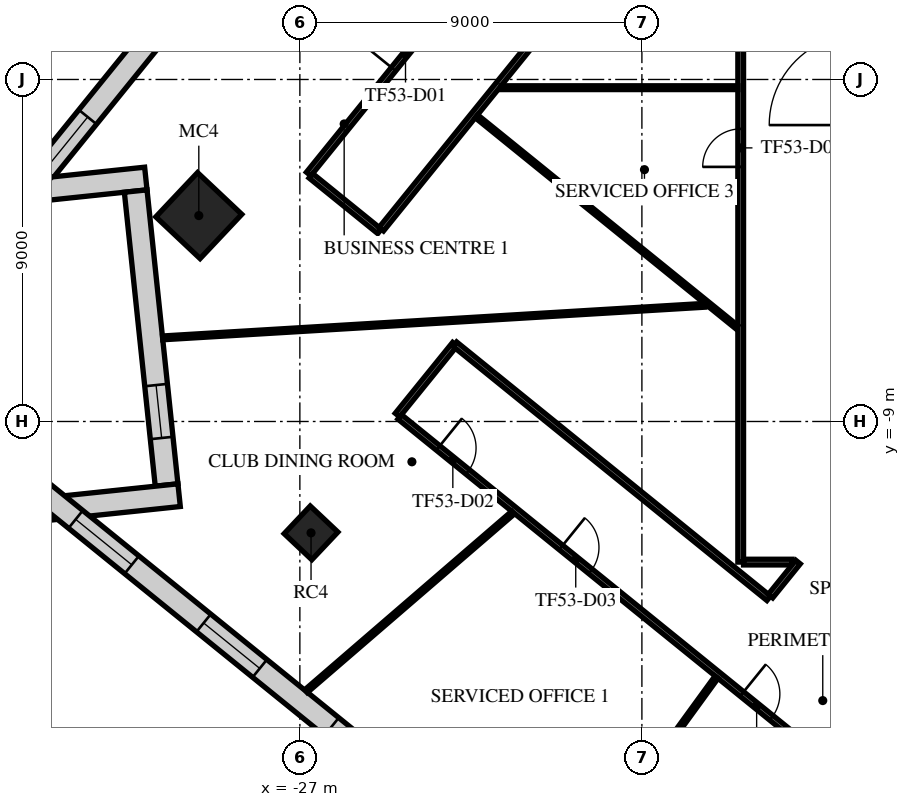
"""IFC4 building model, lengths in metres.
Left out: names, types, materials, properties, quantities, classifications, styles, units other than length and angle.
Written with IfcOpenShell. Run it as: python <this file> out.ifc"""

import sys

from ifc_helpers import new_model, si_unit, direction, frame, frame_2d, origin, origin_2d, place, context, subcontext, project, spatial, rectangle, extrude, element, fill, save


model = new_model("IFC4")
c1 = context("Model", 3, precision=1e-05, world=origin(), true_north=direction((0.0, 1.0)))
c2 = subcontext(c1, "Body", "Model", "MODEL_VIEW")
j1 = project(units=[si_unit("LENGTHUNIT", "METRE"), si_unit("PLANEANGLEUNIT", "RADIAN")], contexts=[c1])
p1 = place(None, origin())
s1 = spatial("IfcSite", under=j1, at=p1, CompositionType="ELEMENT")
p2 = place(p1, origin())
s2 = spatial("IfcBuilding", under=s1, at=p2, CompositionType="ELEMENT")
p3 = place(p2, frame((0.0, 0.0, 225.3)))
s3 = spatial("IfcBuildingStorey", under=s2, at=p3, CompositionType="ELEMENT", Elevation=225.3)
p4 = place(p3, frame((-29.659, -3.582, 0.0), z_axis=(0.0, 0.0, 1.0), x_axis=(0.685916152371, 0.727680583715, 0.0)))
e1 = element("IfcColumn", 1, at=p4, inside=s3, PredefinedType="COLUMN", context=c2, shape_type="SweptSolid", body=[
    extrude(rectangle(XDim=1.6, YDim=1.6, at=origin_2d()), origin(), (0.0, 0.0, 1.0), 4.0),
])
p5 = place(p3, frame((-26.706, -11.931, 0.0), z_axis=(0.0, 0.0, 1.0), x_axis=(0.685916152371, 0.727680583715, 0.0)))
e2 = element("IfcColumn", 2, at=p5, inside=s3, PredefinedType="COLUMN", context=c2, shape_type="SweptSolid", body=[
    extrude(rectangle(XDim=1.0, YDim=1.0, at=origin_2d()), origin(), (0.0, 0.0, 1.0), 4.0),
])
p6 = place(p3, frame((-3.777, 34.584, 0.0), z_axis=(0.0, 0.0, 1.0), x_axis=(-0.629323778295, -0.777143218508, 0.0)))
e3 = element("IfcWall", 3, at=p6, inside=s3, PredefinedType="STANDARD", context=c2, shape_type="SweptSolid", body=[
    extrude(rectangle(XDim=49.0, YDim=0.6, at=frame_2d((24.5, 0.0))), origin(), (0.0, 0.0, 1.0), 3.62),
])
p7 = place(p6, frame((1.227, 0.0, 0.9)))
e4 = element("IfcOpeningElement", 4, at=p7, cuts=e3, PredefinedType="OPENING", context=c2, shape_type="SweptSolid", body=[
    extrude(rectangle(XDim=2.0, YDim=2.1, at=frame_2d((1.0, 1.05))), frame((0.0, 0.31, 0.0), z_axis=(0.0, -1.0, 0.0), x_axis=(1.0, 0.0, 0.0)), (0.0, 0.0, 1.0), 0.62),
])
p8 = place(p6, frame((5.682, 0.0, 0.9)))
e5 = element("IfcOpeningElement", 5, at=p8, cuts=e3, PredefinedType="OPENING", context=c2, shape_type="SweptSolid", body=[
    extrude(rectangle(XDim=2.0, YDim=2.1, at=frame_2d((1.0, 1.05))), frame((0.0, 0.31, 0.0), z_axis=(0.0, -1.0, 0.0), x_axis=(1.0, 0.0, 0.0)), (0.0, 0.0, 1.0), 0.62),
])
p9 = place(p6, frame((10.136, 0.0, 0.9)))
e6 = element("IfcOpeningElement", 6, at=p9, cuts=e3, PredefinedType="OPENING", context=c2, shape_type="SweptSolid", body=[
    extrude(rectangle(XDim=2.0, YDim=2.1, at=frame_2d((1.0, 1.05))), frame((0.0, 0.31, 0.0), z_axis=(0.0, -1.0, 0.0), x_axis=(1.0, 0.0, 0.0)), (0.0, 0.0, 1.0), 0.62),
])
p10 = place(p6, frame((14.591, 0.0, 0.9)))
e7 = element("IfcOpeningElement", 7, at=p10, cuts=e3, PredefinedType="OPENING", context=c2, shape_type="SweptSolid", body=[
    extrude(rectangle(XDim=2.0, YDim=2.1, at=frame_2d((1.0, 1.05))), frame((0.0, 0.31, 0.0), z_axis=(0.0, -1.0, 0.0), x_axis=(1.0, 0.0, 0.0)), (0.0, 0.0, 1.0), 0.62),
])
p11 = place(p6, frame((19.045, 0.0, 0.9)))
e8 = element("IfcOpeningElement", 8, at=p11, cuts=e3, PredefinedType="OPENING", context=c2, shape_type="SweptSolid", body=[
    extrude(rectangle(XDim=2.0, YDim=2.1, at=frame_2d((1.0, 1.05))), frame((0.0, 0.31, 0.0), z_axis=(0.0, -1.0, 0.0), x_axis=(1.0, 0.0, 0.0)), (0.0, 0.0, 1.0), 0.62),
])
p12 = place(p6, frame((23.5, 0.0, 0.9)))
e9 = element("IfcOpeningElement", 9, at=p12, cuts=e3, PredefinedType="OPENING", context=c2, shape_type="SweptSolid", body=[
    extrude(rectangle(XDim=2.0, YDim=2.1, at=frame_2d((1.0, 1.05))), frame((0.0, 0.31, 0.0), z_axis=(0.0, -1.0, 0.0), x_axis=(1.0, 0.0, 0.0)), (0.0, 0.0, 1.0), 0.62),
])
p13 = place(p6, frame((27.955, 0.0, 0.9)))
e10 = element("IfcOpeningElement", 10, at=p13, cuts=e3, PredefinedType="OPENING", context=c2, shape_type="SweptSolid", body=[
    extrude(rectangle(XDim=2.0, YDim=2.1, at=frame_2d((1.0, 1.05))), frame((0.0, 0.31, 0.0), z_axis=(0.0, -1.0, 0.0), x_axis=(1.0, 0.0, 0.0)), (0.0, 0.0, 1.0), 0.62),
])
p14 = place(p6, frame((32.409, 0.0, 0.9)))
e11 = element("IfcOpeningElement", 11, at=p14, cuts=e3, PredefinedType="OPENING", context=c2, shape_type="SweptSolid", body=[
    extrude(rectangle(XDim=2.0, YDim=2.1, at=frame_2d((1.0, 1.05))), frame((0.0, 0.31, 0.0), z_axis=(0.0, -1.0, 0.0), x_axis=(1.0, 0.0, 0.0)), (0.0, 0.0, 1.0), 0.62),
])
p15 = place(p6, frame((36.864, 0.0, 0.9)))
e12 = element("IfcOpeningElement", 12, at=p15, cuts=e3, PredefinedType="OPENING", context=c2, shape_type="SweptSolid", body=[
    extrude(rectangle(XDim=2.0, YDim=2.1, at=frame_2d((1.0, 1.05))), frame((0.0, 0.31, 0.0), z_axis=(0.0, -1.0, 0.0), x_axis=(1.0, 0.0, 0.0)), (0.0, 0.0, 1.0), 0.62),
])
p16 = place(p6, frame((41.318, 0.0, 0.9)))
e13 = element("IfcOpeningElement", 13, at=p16, cuts=e3, PredefinedType="OPENING", context=c2, shape_type="SweptSolid", body=[
    extrude(rectangle(XDim=2.0, YDim=2.1, at=frame_2d((1.0, 1.05))), frame((0.0, 0.31, 0.0), z_axis=(0.0, -1.0, 0.0), x_axis=(1.0, 0.0, 0.0)), (0.0, 0.0, 1.0), 0.62),
])
p17 = place(p6, frame((45.773, 0.0, 0.9)))
e14 = element("IfcOpeningElement", 14, at=p17, cuts=e3, PredefinedType="OPENING", context=c2, shape_type="SweptSolid", body=[
    extrude(rectangle(XDim=2.0, YDim=2.1, at=frame_2d((1.0, 1.05))), frame((0.0, 0.31, 0.0), z_axis=(0.0, -1.0, 0.0), x_axis=(1.0, 0.0, 0.0)), (0.0, 0.0, 1.0), 0.62),
])
p18 = place(p3, frame((-34.878, -3.009, 0.0), z_axis=(0.0, 0.0, 1.0), x_axis=(0.994521092097, 0.104536105602, 0.0)))
e15 = element("IfcWall", 15, at=p18, inside=s3, PredefinedType="STANDARD", context=c2, shape_type="SweptSolid", body=[
    extrude(rectangle(XDim=3.846, YDim=0.6, at=frame_2d((1.923, 0.0))), origin(), (0.0, 0.0, 1.0), 3.62),
])
p19 = place(p3, frame((-31.32, -2.936, 0.0), z_axis=(0.0, 0.0, 1.0), x_axis=(0.104552439276, -0.994519375096, 0.0)))
e16 = element("IfcWall", 16, at=p19, inside=s3, PredefinedType="STANDARD", context=c2, shape_type="SweptSolid", body=[
    extrude(rectangle(XDim=7.778, YDim=0.6, at=frame_2d((3.889, 0.0))), origin(), (0.0, 0.0, 1.0), 3.62),
])
p20 = place(p19, frame((5.134, 0.0, 0.9)))
e17 = element("IfcOpeningElement", 17, at=p20, cuts=e16, PredefinedType="OPENING", context=c2, shape_type="SweptSolid", body=[
    extrude(rectangle(XDim=1.4, YDim=2.1, at=frame_2d((0.7, 1.05))), frame((0.0, 0.31, 0.0), z_axis=(0.0, -1.0, 0.0), x_axis=(1.0, 0.0, 0.0)), (0.0, 0.0, 1.0), 0.62),
])
p21 = place(p3, frame((-30.177, -10.939, 0.0), z_axis=(0.0, 0.0, 1.0), x_axis=(-0.994521092097, -0.104536105602, 0.0)))
e18 = element("IfcWall", 18, at=p21, inside=s3, PredefinedType="STANDARD", context=c2, shape_type="SweptSolid", body=[
    extrude(rectangle(XDim=3.846, YDim=0.6, at=frame_2d((1.923, 0.0))), origin(), (0.0, 0.0, 1.0), 3.62),
])
p22 = place(p3, frame((-33.845, -10.81, 0.0), z_axis=(0.0, 0.0, 1.0), x_axis=(0.777145437972, -0.629321037499, 0.0)))
e19 = element("IfcWall", 19, at=p22, inside=s3, PredefinedType="STANDARD", context=c2, shape_type="SweptSolid", body=[
    extrude(rectangle(XDim=39.0, YDim=0.6, at=frame_2d((19.5, 0.0))), origin(), (0.0, 0.0, 1.0), 3.62),
])
p23 = place(p22, frame((1.217, 0.0, 0.9)))
e20 = element("IfcOpeningElement", 20, at=p23, cuts=e19, PredefinedType="OPENING", context=c2, shape_type="SweptSolid", body=[
    extrude(rectangle(XDim=1.9, YDim=2.1, at=frame_2d((0.95, 1.05))), frame((0.0, 0.31, 0.0), z_axis=(0.0, -1.0, 0.0), x_axis=(1.0, 0.0, 0.0)), (0.0, 0.0, 1.0), 0.62),
])
p24 = place(p22, frame((5.55, 0.0, 0.9)))
e21 = element("IfcOpeningElement", 21, at=p24, cuts=e19, PredefinedType="OPENING", context=c2, shape_type="SweptSolid", body=[
    extrude(rectangle(XDim=1.9, YDim=2.1, at=frame_2d((0.95, 1.05))), frame((0.0, 0.31, 0.0), z_axis=(0.0, -1.0, 0.0), x_axis=(1.0, 0.0, 0.0)), (0.0, 0.0, 1.0), 0.62),
])
p25 = place(p22, frame((9.883, 0.0, 0.9)))
e22 = element("IfcOpeningElement", 22, at=p25, cuts=e19, PredefinedType="OPENING", context=c2, shape_type="SweptSolid", body=[
    extrude(rectangle(XDim=1.9, YDim=2.1, at=frame_2d((0.95, 1.05))), frame((0.0, 0.31, 0.0), z_axis=(0.0, -1.0, 0.0), x_axis=(1.0, 0.0, 0.0)), (0.0, 0.0, 1.0), 0.62),
])
p26 = place(p22, frame((14.217, 0.0, 0.9)))
e23 = element("IfcOpeningElement", 23, at=p26, cuts=e19, PredefinedType="OPENING", context=c2, shape_type="SweptSolid", body=[
    extrude(rectangle(XDim=1.9, YDim=2.1, at=frame_2d((0.95, 1.05))), frame((0.0, 0.31, 0.0), z_axis=(0.0, -1.0, 0.0), x_axis=(1.0, 0.0, 0.0)), (0.0, 0.0, 1.0), 0.62),
])
p27 = place(p22, frame((18.55, 0.0, 0.9)))
e24 = element("IfcOpeningElement", 24, at=p27, cuts=e19, PredefinedType="OPENING", context=c2, shape_type="SweptSolid", body=[
    extrude(rectangle(XDim=1.9, YDim=2.1, at=frame_2d((0.95, 1.05))), frame((0.0, 0.31, 0.0), z_axis=(0.0, -1.0, 0.0), x_axis=(1.0, 0.0, 0.0)), (0.0, 0.0, 1.0), 0.62),
])
p28 = place(p22, frame((22.883, 0.0, 0.9)))
e25 = element("IfcOpeningElement", 25, at=p28, cuts=e19, PredefinedType="OPENING", context=c2, shape_type="SweptSolid", body=[
    extrude(rectangle(XDim=1.9, YDim=2.1, at=frame_2d((0.95, 1.05))), frame((0.0, 0.31, 0.0), z_axis=(0.0, -1.0, 0.0), x_axis=(1.0, 0.0, 0.0)), (0.0, 0.0, 1.0), 0.62),
])
p29 = place(p22, frame((27.217, 0.0, 0.9)))
e26 = element("IfcOpeningElement", 26, at=p29, cuts=e19, PredefinedType="OPENING", context=c2, shape_type="SweptSolid", body=[
    extrude(rectangle(XDim=1.9, YDim=2.1, at=frame_2d((0.95, 1.05))), frame((0.0, 0.31, 0.0), z_axis=(0.0, -1.0, 0.0), x_axis=(1.0, 0.0, 0.0)), (0.0, 0.0, 1.0), 0.62),
])
p30 = place(p22, frame((31.55, 0.0, 0.9)))
e27 = element("IfcOpeningElement", 27, at=p30, cuts=e19, PredefinedType="OPENING", context=c2, shape_type="SweptSolid", body=[
    extrude(rectangle(XDim=1.9, YDim=2.1, at=frame_2d((0.95, 1.05))), frame((0.0, 0.31, 0.0), z_axis=(0.0, -1.0, 0.0), x_axis=(1.0, 0.0, 0.0)), (0.0, 0.0, 1.0), 0.62),
])
p31 = place(p22, frame((35.883, 0.0, 0.9)))
e28 = element("IfcOpeningElement", 28, at=p31, cuts=e19, PredefinedType="OPENING", context=c2, shape_type="SweptSolid", body=[
    extrude(rectangle(XDim=1.9, YDim=2.1, at=frame_2d((0.95, 1.05))), frame((0.0, 0.31, 0.0), z_axis=(0.0, -1.0, 0.0), x_axis=(1.0, 0.0, 0.0)), (0.0, 0.0, 1.0), 0.62),
])
p32 = place(p3, frame((-26.769, -2.487, 0.0), z_axis=(0.0, 0.0, 1.0), x_axis=(0.629320703929, 0.777145708092, 0.0)))
e29 = element("IfcWall", 29, at=p32, inside=s3, PredefinedType="PARTITIONING", context=c2, shape_type="SweptSolid", body=[
    extrude(rectangle(XDim=37.558, YDim=0.15, at=frame_2d((18.779, 0.0))), origin(), (0.0, 0.0, 1.0), 2.97),
])
p33 = place(p32, frame((3.55, 0.0, 0.0)))
e30 = element("IfcOpeningElement", 30, at=p33, cuts=e29, PredefinedType="OPENING", context=c2, shape_type="SweptSolid", body=[
    extrude(rectangle(XDim=1.0, YDim=2.1, at=frame_2d((0.5, 1.05))), frame((0.0, 0.085, 0.0), z_axis=(0.0, -1.0, 0.0), x_axis=(1.0, 0.0, 0.0)), (0.0, 0.0, 1.0), 0.17),
])
p34 = place(p32, frame((11.862, 0.0, 0.0)))
e31 = element("IfcOpeningElement", 31, at=p34, cuts=e29, PredefinedType="OPENING", context=c2, shape_type="SweptSolid", body=[
    extrude(rectangle(XDim=1.0, YDim=2.1, at=frame_2d((0.5, 1.05))), frame((0.0, 0.085, 0.0), z_axis=(0.0, -1.0, 0.0), x_axis=(1.0, 0.0, 0.0)), (0.0, 0.0, 1.0), 0.17),
])
p35 = place(p32, frame((21.452, 0.0, 0.0)))
e32 = element("IfcOpeningElement", 32, at=p35, cuts=e29, PredefinedType="OPENING", context=c2, shape_type="SweptSolid", body=[
    extrude(rectangle(XDim=1.0, YDim=2.1, at=frame_2d((0.5, 1.05))), frame((0.0, 0.085, 0.0), z_axis=(0.0, -1.0, 0.0), x_axis=(1.0, 0.0, 0.0)), (0.0, 0.0, 1.0), 0.17),
])
p36 = place(p32, frame((31.223, 0.0, 0.0)))
e33 = element("IfcOpeningElement", 33, at=p36, cuts=e29, PredefinedType="OPENING", context=c2, shape_type="SweptSolid", body=[
    extrude(rectangle(XDim=1.0, YDim=2.1, at=frame_2d((0.5, 1.05))), frame((0.0, 0.085, 0.0), z_axis=(0.0, -1.0, 0.0), x_axis=(1.0, 0.0, 0.0)), (0.0, 0.0, 1.0), 0.17),
])
p37 = place(p32, frame((35.359, 0.0, 0.0)))
e34 = element("IfcOpeningElement", 34, at=p37, cuts=e29, PredefinedType="OPENING", context=c2, shape_type="SweptSolid", body=[
    extrude(rectangle(XDim=1.0, YDim=2.1, at=frame_2d((0.5, 1.05))), frame((0.0, 0.085, 0.0), z_axis=(0.0, -1.0, 0.0), x_axis=(1.0, 0.0, 0.0)), (0.0, 0.0, 1.0), 0.17),
])
p38 = place(p3, frame((-26.711, -2.534, 0.0), z_axis=(0.0, 0.0, 1.0), x_axis=(0.777166601342, -0.62929490206, 0.0)))
e35 = element("IfcWall", 35, at=p38, inside=s3, PredefinedType="PARTITIONING", context=c2, shape_type="SweptSolid", body=[
    extrude(rectangle(XDim=2.325, YDim=0.15, at=frame_2d((1.162, 0.0))), origin(), (0.0, 0.0, 1.0), 3.17),
])
p39 = place(p3, frame((-24.857, -3.939, 0.0), z_axis=(0.0, 0.0, 1.0), x_axis=(0.629334227899, 0.777134756393, 0.0)))
e36 = element("IfcWall", 36, at=p39, inside=s3, PredefinedType="PARTITIONING", context=c2, shape_type="SweptSolid", body=[
    extrude(rectangle(XDim=15.027, YDim=0.15, at=frame_2d((7.513, 0.0))), origin(), (0.0, 0.0, 1.0), 3.17),
])
p40 = place(p3, frame((-24.432, -8.831, 0.0), z_axis=(0.0, 0.0, 1.0), x_axis=(0.629201155621, 0.77724250126, 0.0)))
e37 = element("IfcWall", 37, at=p40, inside=s3, PredefinedType="PARTITIONING", context=c2, shape_type="SweptSolid", body=[
    extrude(rectangle(XDim=2.399, YDim=0.15, at=frame_2d((1.2, 0.0))), origin(), (0.0, 0.0, 1.0), 3.17),
])
p41 = place(p3, frame((-24.374, -8.878, 0.0), z_axis=(0.0, 0.0, 1.0), x_axis=(0.777132572121, -0.629336925143, 0.0)))
e38 = element("IfcWall", 38, at=p41, inside=s3, PredefinedType="PARTITIONING", context=c2, shape_type="SweptSolid", body=[
    extrude(rectangle(XDim=26.785, YDim=0.15, at=frame_2d((13.393, 0.0))), origin(), (0.0, 0.0, 1.0), 3.17),
])
p42 = place(p41, frame((1.3, 0.0, 0.0)))
e39 = element("IfcOpeningElement", 39, at=p42, cuts=e38, PredefinedType="OPENING", context=c2, shape_type="SweptSolid", body=[
    extrude(rectangle(XDim=1.0, YDim=2.1, at=frame_2d((0.5, 1.05))), frame((0.0, 0.085, 0.0), z_axis=(0.0, -1.0, 0.0), x_axis=(1.0, 0.0, 0.0)), (0.0, 0.0, 1.0), 0.17),
])
p43 = place(p41, frame((5.461, 0.0, 0.0)))
e40 = element("IfcOpeningElement", 40, at=p43, cuts=e38, PredefinedType="OPENING", context=c2, shape_type="SweptSolid", body=[
    extrude(rectangle(XDim=1.0, YDim=2.1, at=frame_2d((0.5, 1.05))), frame((0.0, 0.085, 0.0), z_axis=(0.0, -1.0, 0.0), x_axis=(1.0, 0.0, 0.0)), (0.0, 0.0, 1.0), 0.17),
])
p44 = place(p41, frame((11.587, 0.0, 0.0)))
e41 = element("IfcOpeningElement", 41, at=p44, cuts=e38, PredefinedType="OPENING", context=c2, shape_type="SweptSolid", body=[
    extrude(rectangle(XDim=1.0, YDim=2.1, at=frame_2d((0.5, 1.05))), frame((0.0, 0.085, 0.0), z_axis=(0.0, -1.0, 0.0), x_axis=(1.0, 0.0, 0.0)), (0.0, 0.0, 1.0), 0.17),
])
p45 = place(p3, frame((-22.922, -6.965, 0.0), z_axis=(0.0, 0.0, 1.0), x_axis=(0.777148029431, -0.629317837306, 0.0)))
e42 = element("IfcWall", 42, at=p45, inside=s3, PredefinedType="PARTITIONING", context=c2, shape_type="SweptSolid", body=[
    extrude(rectangle(XDim=10.627, YDim=0.15, at=frame_2d((5.314, 0.0))), origin(), (0.0, 0.0, 1.0), 3.17),
])
p46 = place(p3, frame((-15.4, -12.7, 0.0), z_axis=(0.0, 0.0, 1.0), x_axis=(0.0, 1.0, 0.0)))
e43 = element("IfcWall", 43, at=p46, inside=s3, PredefinedType="PARTITIONING", context=c2, shape_type="SweptSolid", body=[
    extrude(rectangle(XDim=20.227, YDim=0.15, at=frame_2d((10.114, 0.0))), origin(), (0.0, 0.0, 1.0), 3.17),
])
p47 = place(p46, frame((10.4, 0.0, 0.0)))
e44 = element("IfcOpeningElement", 44, at=p47, cuts=e43, PredefinedType="OPENING", context=c2, shape_type="SweptSolid", body=[
    extrude(rectangle(XDim=1.0, YDim=2.1, at=frame_2d((0.5, 1.05))), frame((0.0, 0.085, 0.0), z_axis=(0.0, -1.0, 0.0), x_axis=(1.0, 0.0, 0.0)), (0.0, 0.0, 1.0), 0.17),
])
p48 = place(p46, frame((15.784, 0.0, 0.0)))
e45 = element("IfcOpeningElement", 45, at=p48, cuts=e43, PredefinedType="OPENING", context=c2, shape_type="SweptSolid", body=[
    extrude(rectangle(XDim=1.0, YDim=2.1, at=frame_2d((0.5, 1.05))), frame((0.0, 0.085, 0.0), z_axis=(0.0, -1.0, 0.0), x_axis=(1.0, 0.0, 0.0)), (0.0, 0.0, 1.0), 0.17),
])
p49 = place(p3, frame((-15.325, -12.7, 0.0), z_axis=(0.0, 0.0, 1.0), x_axis=(1.0, 0.0, 0.0)))
e46 = element("IfcWall", 46, at=p49, inside=s3, PredefinedType="PARTITIONING", context=c2, shape_type="SweptSolid", body=[
    extrude(rectangle(XDim=1.277, YDim=0.15, at=frame_2d((0.638, 0.0))), origin(), (0.0, 0.0, 1.0), 3.17),
])
p50 = place(p3, frame((-14.616, -13.595, 0.0), z_axis=(0.0, 0.0, 1.0), x_axis=(0.629338514223, 0.777131285251, 0.0)))
e47 = element("IfcWall", 47, at=p50, inside=s3, PredefinedType="PARTITIONING", context=c2, shape_type="SweptSolid", body=[
    extrude(rectangle(XDim=1.151, YDim=0.15, at=frame_2d((0.576, 0.0))), origin(), (0.0, 0.0, 1.0), 3.17),
])
p51 = place(p3, frame((-30.61, -6.8, 0.0), z_axis=(0.0, 0.0, 1.0), x_axis=(0.998198116096, 0.060004341699, 0.0)))
e48 = element("IfcWall", 48, at=p51, inside=s3, PredefinedType="PARTITIONING", context=c2, shape_type="SweptSolid", body=[
    extrude(rectangle(XDim=14.285, YDim=0.1, at=frame_2d((7.143, 0.0))), origin(), (0.0, 0.0, 1.0), 2.97),
])
p52 = place(p3, frame((-26.837, -16.096, 0.0), z_axis=(0.0, 0.0, 1.0), x_axis=(0.757242011922, 0.653134393046, 0.0)))
e49 = element("IfcWall", 49, at=p52, inside=s3, PredefinedType="PARTITIONING", context=c2, shape_type="SweptSolid", body=[
    extrude(rectangle(XDim=7.19, YDim=0.1, at=frame_2d((3.595, 0.0))), origin(), (0.0, 0.0, 1.0), 2.97),
])
p53 = place(p3, frame((-22.355, -0.968, 0.0), z_axis=(0.0, 0.0, 1.0), x_axis=(0.777138402267, -0.629329725757, 0.0)))
e50 = element("IfcWall", 50, at=p53, inside=s3, PredefinedType="PARTITIONING", context=c2, shape_type="SweptSolid", body=[
    extrude(rectangle(XDim=8.812, YDim=0.1, at=frame_2d((4.406, 0.0))), origin(), (0.0, 0.0, 1.0), 3.17),
])
p54 = place(p3, frame((-21.705, -0.216, 0.0), z_axis=(0.0, 0.0, 1.0), x_axis=(1.0, 0.0, 0.0)))
e51 = element("IfcWall", 51, at=p54, inside=s3, PredefinedType="PARTITIONING", context=c2, shape_type="SweptSolid", body=[
    extrude(rectangle(XDim=6.23, YDim=0.1, at=frame_2d((3.115, 0.0))), origin(), (0.0, 0.0, 1.0), 3.62),
])
p55 = place(p3, frame((-18.441, -19.034, 0.0), z_axis=(0.0, 0.0, 1.0), x_axis=(0.588267582256, 0.808666341371, 0.0)))
e52 = element("IfcWall", 52, at=p55, inside=s3, PredefinedType="PARTITIONING", context=c2, shape_type="SweptSolid", body=[
    extrude(rectangle(XDim=4.087, YDim=0.1, at=frame_2d((2.044, 0.0))), origin(), (0.0, 0.0, 1.0), 3.05),
])
p56 = place(p17, origin())
e53 = element("IfcWindow", 53, at=p56, inside=s3, PartitioningType="SINGLE_PANEL", PredefinedType="WINDOW", context=c2, shape_type="SweptSolid", body=[
    extrude(rectangle(XDim=2.0, YDim=2.1, at=frame_2d((1.0, 1.05))), frame((0.0, 0.03, 0.0), z_axis=(0.0, -1.0, 0.0), x_axis=(1.0, 0.0, 0.0)), (0.0, 0.0, 1.0), 0.06),
])
fill(e14, e53)
p57 = place(p20, origin())
e54 = element("IfcWindow", 54, at=p57, inside=s3, PartitioningType="SINGLE_PANEL", PredefinedType="WINDOW", context=c2, shape_type="SweptSolid", body=[
    extrude(rectangle(XDim=1.4, YDim=2.1, at=frame_2d((0.7, 1.05))), frame((0.0, 0.03, 0.0), z_axis=(0.0, -1.0, 0.0), x_axis=(1.0, 0.0, 0.0)), (0.0, 0.0, 1.0), 0.06),
])
fill(e17, e54)
p58 = place(p23, origin())
e55 = element("IfcWindow", 55, at=p58, inside=s3, PartitioningType="SINGLE_PANEL", PredefinedType="WINDOW", context=c2, shape_type="SweptSolid", body=[
    extrude(rectangle(XDim=1.9, YDim=2.1, at=frame_2d((0.95, 1.05))), frame((0.0, 0.03, 0.0), z_axis=(0.0, -1.0, 0.0), x_axis=(1.0, 0.0, 0.0)), (0.0, 0.0, 1.0), 0.06),
])
fill(e20, e55)
p59 = place(p24, origin())
e56 = element("IfcWindow", 56, at=p59, inside=s3, PartitioningType="SINGLE_PANEL", PredefinedType="WINDOW", context=c2, shape_type="SweptSolid", body=[
    extrude(rectangle(XDim=1.9, YDim=2.1, at=frame_2d((0.95, 1.05))), frame((0.0, 0.03, 0.0), z_axis=(0.0, -1.0, 0.0), x_axis=(1.0, 0.0, 0.0)), (0.0, 0.0, 1.0), 0.06),
])
fill(e21, e56)
p60 = place(p25, origin())
e57 = element("IfcWindow", 57, at=p60, inside=s3, PartitioningType="SINGLE_PANEL", PredefinedType="WINDOW", context=c2, shape_type="SweptSolid", body=[
    extrude(rectangle(XDim=1.9, YDim=2.1, at=frame_2d((0.95, 1.05))), frame((0.0, 0.03, 0.0), z_axis=(0.0, -1.0, 0.0), x_axis=(1.0, 0.0, 0.0)), (0.0, 0.0, 1.0), 0.06),
])
fill(e22, e57)
p61 = place(p33, origin())
e58 = element("IfcDoor", 58, at=p61, inside=s3, OperationType="SINGLE_SWING_RIGHT", PredefinedType="DOOR", context=c2, shape_type="SweptSolid", body=[
    extrude(rectangle(XDim=1.0, YDim=2.1, at=frame_2d((0.5, 1.05))), frame((0.0, 0.025, 0.0), z_axis=(0.0, -1.0, 0.0), x_axis=(1.0, 0.0, 0.0)), (0.0, 0.0, 1.0), 0.05),
])
fill(e30, e58)
p62 = place(p42, frame((1.0, 0.0, 0.0), z_axis=(0.0, 0.0, 1.0), x_axis=(-1.0, 0.0, 0.0)))
e59 = element("IfcDoor", 59, at=p62, inside=s3, OperationType="SINGLE_SWING_LEFT", PredefinedType="DOOR", context=c2, shape_type="SweptSolid", body=[
    extrude(rectangle(XDim=1.0, YDim=2.1, at=frame_2d((0.5, 1.05))), frame((0.0, 0.025, 0.0), z_axis=(0.0, -1.0, 0.0), x_axis=(1.0, 0.0, 0.0)), (0.0, 0.0, 1.0), 0.05),
])
fill(e39, e59)
p63 = place(p43, frame((1.0, 0.0, 0.0), z_axis=(0.0, 0.0, 1.0), x_axis=(-1.0, 0.0, 0.0)))
e60 = element("IfcDoor", 60, at=p63, inside=s3, OperationType="SINGLE_SWING_LEFT", PredefinedType="DOOR", context=c2, shape_type="SweptSolid", body=[
    extrude(rectangle(XDim=1.0, YDim=2.1, at=frame_2d((0.5, 1.05))), frame((0.0, 0.025, 0.0), z_axis=(0.0, -1.0, 0.0), x_axis=(1.0, 0.0, 0.0)), (0.0, 0.0, 1.0), 0.05),
])
fill(e40, e60)
p64 = place(p47, origin())
e61 = element("IfcDoor", 61, at=p64, inside=s3, OperationType="SINGLE_SWING_RIGHT", PredefinedType="DOOR", context=c2, shape_type="SweptSolid", body=[
    extrude(rectangle(XDim=1.0, YDim=2.1, at=frame_2d((0.5, 1.05))), frame((0.0, 0.025, 0.0), z_axis=(0.0, -1.0, 0.0), x_axis=(1.0, 0.0, 0.0)), (0.0, 0.0, 1.0), 0.05),
])
fill(e44, e61)
p65 = place(p44, frame((1.0, 0.0, 0.0), z_axis=(0.0, 0.0, 1.0), x_axis=(-1.0, 0.0, 0.0)))
e62 = element("IfcDoor", 62, at=p65, inside=s3, OperationType="SINGLE_SWING_RIGHT", PredefinedType="DOOR", context=c2, shape_type="SweptSolid", body=[
    extrude(rectangle(XDim=1.0, YDim=2.1, at=frame_2d((0.5, 1.05))), frame((0.0, 0.025, 0.0), z_axis=(0.0, -1.0, 0.0), x_axis=(1.0, 0.0, 0.0)), (0.0, 0.0, 1.0), 0.05),
])
fill(e41, e62)
save(model, sys.argv[1])
